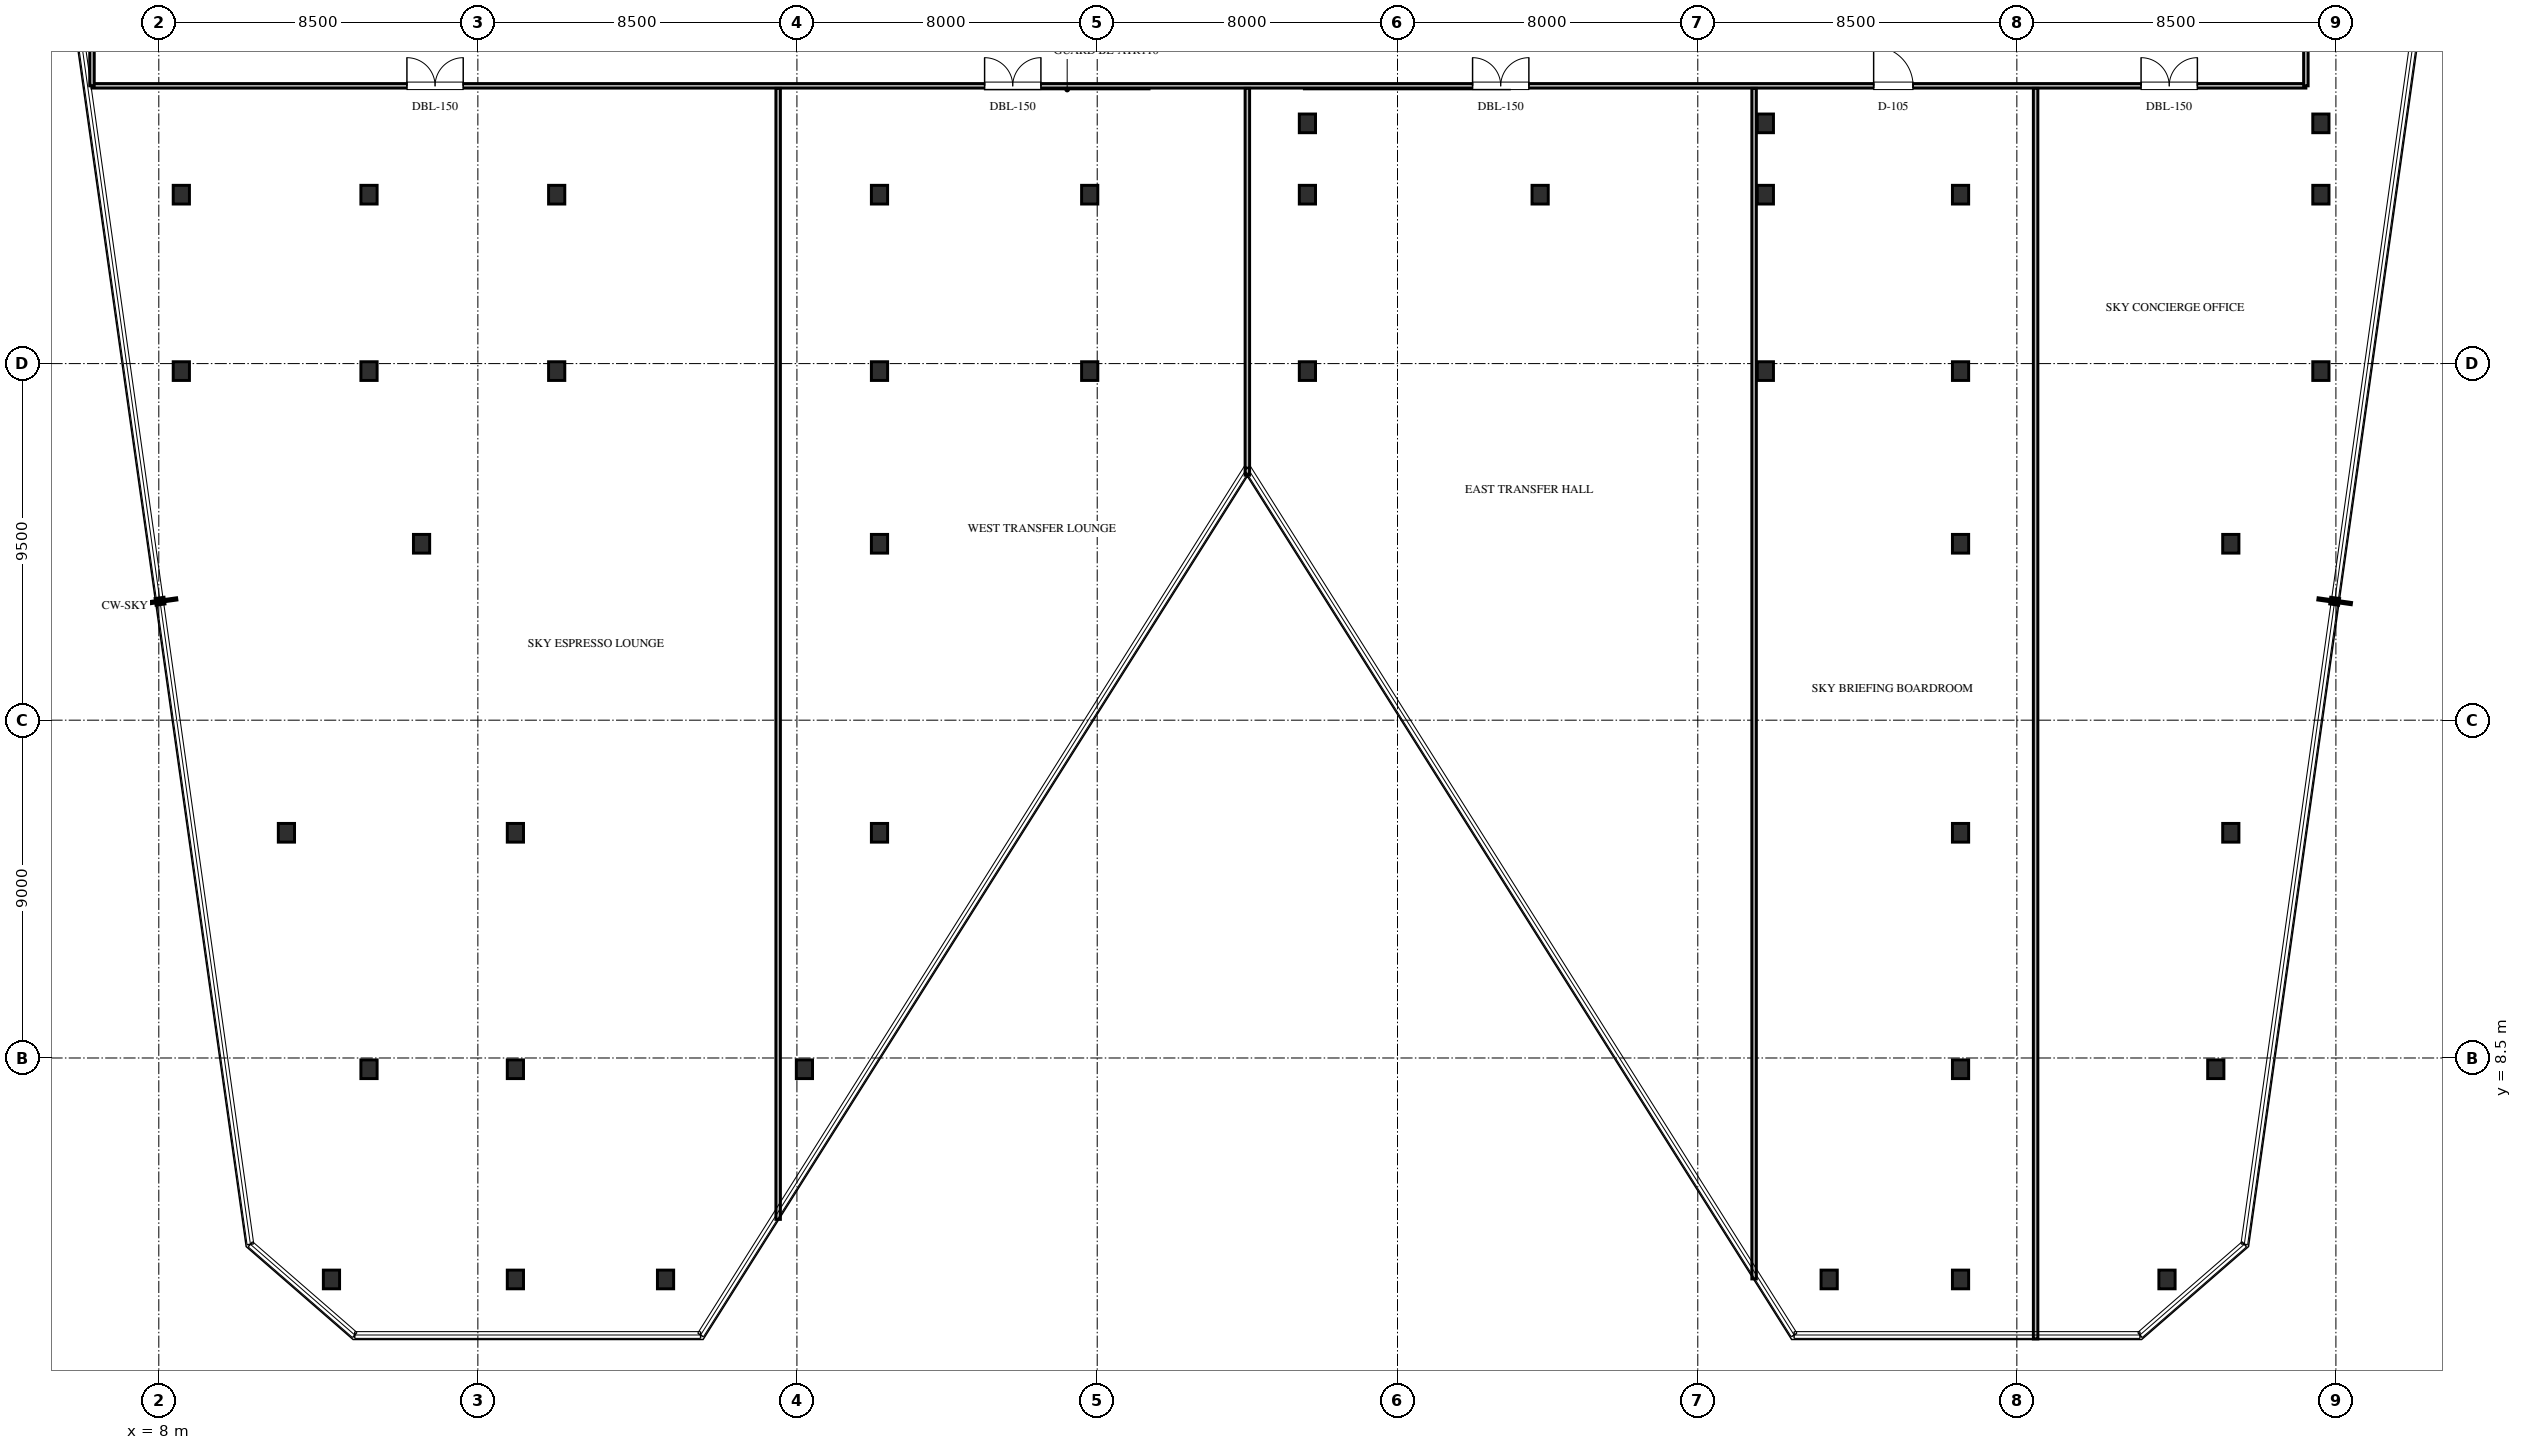
"""IFC4 building model, lengths in metres.
Left out: names, types, materials, properties, quantities, classifications, styles, units other than length and angle.
Written with IfcOpenShell. Run it as: python <this file> out.ifc"""

import sys

from ifc_helpers import new_model, si_unit, direction, frame, frame_2d, origin, origin_2d, place, context, subcontext, project, spatial, rectangle, i_section, extrude, element, fill, save


model = new_model("IFC4")
c1 = context("Model", 3, precision=1e-05, world=origin(), true_north=direction((0.0, 1.0)))
c2 = subcontext(c1, "Body", "Model", "MODEL_VIEW")
j1 = project(units=[si_unit("LENGTHUNIT", "METRE"), si_unit("PLANEANGLEUNIT", "RADIAN")], contexts=[c1])
p1 = place(None, origin())
s1 = spatial("IfcSite", under=j1, at=p1, CompositionType="ELEMENT")
p2 = place(p1, origin())
s2 = spatial("IfcBuilding", under=s1, at=p2, CompositionType="ELEMENT")
p3 = place(p2, frame((0.0, 0.0, 91.5)))
s3 = spatial("IfcBuildingStorey", under=s2, at=p3, CompositionType="ELEMENT", Elevation=91.5)
for number, where, z_axis, x_axis in (
    (1, (12.6, 2.6, 0.0), (0.0, 0.0, 1.0), (1.0, 0.0, 0.0)),
    (2, (56.0, 14.5, 0.0), (0.0, 0.0, 1.0), (1.0, 0.0, 0.0)),
    (3, (63.2, 14.5, 0.0), (0.0, 0.0, 1.0), (1.0, 0.0, 0.0)),
    (4, (15.0, 22.2, 0.0), (0.0, 0.0, 1.0), (1.0, 0.0, 0.0)),
    (5, (27.2, 22.2, 0.0), (0.0, 0.0, 1.0), (1.0, 0.0, 0.0)),
    (6, (56.0, 22.2, 0.0), (0.0, 0.0, 1.0), (1.0, 0.0, 0.0)),
    (7, (63.2, 22.2, 0.0), (0.0, 0.0, 1.0), (1.0, 0.0, 0.0)),
    (8, (8.6, 26.8, 0.0), (0.0, 0.0, 1.0), (1.0, 0.0, 0.0)),
    (9, (13.6, 26.8, 0.0), (0.0, 0.0, 1.0), (1.0, 0.0, 0.0)),
    (10, (18.6, 26.8, 0.0), (0.0, 0.0, 1.0), (1.0, 0.0, 0.0)),
    (11, (27.2, 26.8, 0.0), (0.0, 0.0, 1.0), (1.0, 0.0, 0.0)),
    (12, (32.8, 26.8, 0.0), (0.0, 0.0, 1.0), (1.0, 0.0, 0.0)),
    (13, (38.6, 26.8, 0.0), (0.0, 0.0, 1.0), (1.0, 0.0, 0.0)),
    (14, (50.8, 26.8, 0.0), (0.0, 0.0, 1.0), (1.0, 0.0, 0.0)),
    (15, (56.0, 26.8, 0.0), (0.0, 0.0, 1.0), (1.0, 0.0, 0.0)),
    (16, (65.6, 26.8, 0.0), (0.0, 0.0, 1.0), (1.0, 0.0, 0.0)),
    (17, (8.6, 31.5, 0.0), (0.0, 0.0, 1.0), (1.0, 0.0, 0.0)),
    (18, (13.6, 31.5, 0.0), (0.0, 0.0, 1.0), (1.0, 0.0, 0.0)),
    (19, (17.5, 2.6, 0.0), (0.0, 0.0, 1.0), (1.0, 0.0, 0.0)),
    (20, (18.6, 31.5, 0.0), (0.0, 0.0, 1.0), (1.0, 0.0, 0.0)),
    (21, (27.2, 31.5, 0.0), (0.0, 0.0, 1.0), (1.0, 0.0, 0.0)),
    (22, (32.8, 31.5, 0.0), (0.0, 0.0, 1.0), (1.0, 0.0, 0.0)),
    (23, (38.6, 31.5, 0.0), (0.0, 0.0, 1.0), (1.0, 0.0, 0.0)),
    (24, (44.8, 31.5, 0.0), (0.0, 0.0, 1.0), (1.0, 0.0, 0.0)),
    (25, (50.8, 31.5, 0.0), (0.0, 0.0, 1.0), (1.0, 0.0, 0.0)),
    (26, (56.0, 31.5, 0.0), (0.0, 0.0, 1.0), (1.0, 0.0, 0.0)),
    (27, (65.6, 31.5, 0.0), (0.0, 0.0, 1.0), (1.0, 0.0, 0.0)),
    (28, (21.5, 2.6, 0.0), (0.0, 0.0, 1.0), (1.0, 0.0, 0.0)),
    (29, (52.5, 2.6, 0.0), (0.0, 0.0, 1.0), (1.0, 0.0, 0.0)),
    (30, (56.0, 2.6, 0.0), (0.0, 0.0, 1.0), (1.0, 0.0, 0.0)),
    (31, (61.5, 2.6, 0.0), (0.0, 0.0, 1.0), (1.0, 0.0, 0.0)),
    (32, (13.6, 8.2, 0.0), (0.0, 0.0, 1.0), (1.0, 0.0, 0.0)),
    (33, (17.5, 8.2, 0.0), (0.0, 0.0, 1.0), (1.0, 0.0, 0.0)),
    (34, (25.2, 8.2, 0.0), (0.0, 0.0, 1.0), (1.0, 0.0, 0.0)),
    (35, (56.0, 8.2, 0.0), (0.0, 0.0, 1.0), (1.0, 0.0, 0.0)),
    (36, (62.8, 8.2, 0.0), (0.0, 0.0, 1.0), (1.0, 0.0, 0.0)),
    (37, (11.4, 14.5, 0.0), (0.0, 0.0, 1.0), (1.0, 0.0, 0.0)),
    (38, (17.5, 14.5, 0.0), (0.0, 0.0, 1.0), (1.0, 0.0, 0.0)),
    (39, (27.2, 14.5, 0.0), (0.0, 0.0, 1.0), (1.0, 0.0, 0.0)),
    (40, (38.6, 33.4, 0.0), (0.0, 0.0, 1.0), (1.0, 0.0, 0.0)),
    (41, (50.8, 33.4, 0.0), (0.0, 0.0, 1.0), (1.0, 0.0, 0.0)),
    (42, (65.6, 33.4, 0.0), (0.0, 0.0, 1.0), (1.0, 0.0, 0.0)),
):
    element("IfcColumn", number, at=place(p3, frame(where, z_axis=z_axis, x_axis=x_axis)), inside=s3, PredefinedType="COLUMN", context=c2, shape_type="SweptSolid", body=[
        extrude(i_section(OverallWidth=0.432, OverallDepth=0.498, WebThickness=0.056, FlangeThickness=0.089, FilletRadius=0.03, at=origin_2d()), origin(), (0.0, 0.0, 1.0), 4.5),
    ])
p4 = place(p3, frame((6.22, 34.4, 0.0), z_axis=(0.0, 0.0, 1.0), x_axis=(1.0, 0.0, 0.0)))
e43 = element("IfcWall", 43, at=p4, inside=s3, PredefinedType="PARTITIONING", context=c2, shape_type="SweptSolid", body=[
    extrude(rectangle(XDim=58.98, YDim=0.12, at=frame_2d((29.49, 0.0))), origin(), (0.0, 0.0, 1.0), 3.323),
])
p5 = place(p4, frame((8.39, 0.0, 0.0)))
e44 = element("IfcOpeningElement", 44, at=p5, cuts=e43, PredefinedType="OPENING", context=c2, shape_type="SweptSolid", body=[
    extrude(rectangle(XDim=1.5, YDim=2.2, at=frame_2d((0.75, 1.1))), frame((0.0, 0.07, 0.0), z_axis=(0.0, -1.0, 0.0), x_axis=(1.0, 0.0, 0.0)), (0.0, 0.0, 1.0), 0.14),
])
p6 = place(p4, frame((23.78, 0.0, 0.0)))
e45 = element("IfcOpeningElement", 45, at=p6, cuts=e43, PredefinedType="OPENING", context=c2, shape_type="SweptSolid", body=[
    extrude(rectangle(XDim=1.5, YDim=2.2, at=frame_2d((0.75, 1.1))), frame((0.0, 0.07, 0.0), z_axis=(0.0, -1.0, 0.0), x_axis=(1.0, 0.0, 0.0)), (0.0, 0.0, 1.0), 0.14),
])
p7 = place(p4, frame((36.78, 0.0, 0.0)))
e46 = element("IfcOpeningElement", 46, at=p7, cuts=e43, PredefinedType="OPENING", context=c2, shape_type="SweptSolid", body=[
    extrude(rectangle(XDim=1.5, YDim=2.2, at=frame_2d((0.75, 1.1))), frame((0.0, 0.07, 0.0), z_axis=(0.0, -1.0, 0.0), x_axis=(1.0, 0.0, 0.0)), (0.0, 0.0, 1.0), 0.14),
])
p8 = place(p4, frame((47.465, 0.0, 0.0)))
e47 = element("IfcOpeningElement", 47, at=p8, cuts=e43, PredefinedType="OPENING", context=c2, shape_type="SweptSolid", body=[
    extrude(rectangle(XDim=1.05, YDim=2.2, at=frame_2d((0.525, 1.1))), frame((0.0, 0.07, 0.0), z_axis=(0.0, -1.0, 0.0), x_axis=(1.0, 0.0, 0.0)), (0.0, 0.0, 1.0), 0.14),
])
p9 = place(p4, frame((54.59, 0.0, 0.0)))
e48 = element("IfcOpeningElement", 48, at=p9, cuts=e43, PredefinedType="OPENING", context=c2, shape_type="SweptSolid", body=[
    extrude(rectangle(XDim=1.5, YDim=2.2, at=frame_2d((0.75, 1.1))), frame((0.0, 0.07, 0.0), z_axis=(0.0, -1.0, 0.0), x_axis=(1.0, 0.0, 0.0)), (0.0, 0.0, 1.0), 0.14),
])
p10 = place(p3, frame((6.22, 34.4, 0.0), z_axis=(0.0, 0.0, 1.0), x_axis=(0.0, 1.0, 0.0)))
e49 = element("IfcWall", 49, at=p10, inside=s3, PredefinedType="PARTITIONING", context=c2, shape_type="SweptSolid", body=[
    extrude(rectangle(XDim=3.65, YDim=0.12, at=frame_2d((1.825, 0.0))), origin(), (0.0, 0.0, 1.0), 4.25),
])
p11 = place(p3, frame((65.2, 34.4, 0.0), z_axis=(0.0, 0.0, 1.0), x_axis=(0.0, 1.0, 0.0)))
e50 = element("IfcWall", 50, at=p11, inside=s3, PredefinedType="PARTITIONING", context=c2, shape_type="SweptSolid", body=[
    extrude(rectangle(XDim=3.217, YDim=0.12, at=frame_2d((1.608, 0.0))), origin(), (0.0, 0.0, 1.0), 3.323),
])
p12 = place(p3, frame((24.5, 4.2, 0.0), z_axis=(0.0, 0.0, 1.0), x_axis=(0.0, 1.0, 0.0)))
e51 = element("IfcWall", 51, at=p12, inside=s3, PredefinedType="PARTITIONING", context=c2, shape_type="SweptSolid", body=[
    extrude(rectangle(XDim=30.132, YDim=0.12, at=frame_2d((15.066, 0.0))), origin(), (0.0, 0.0, 1.0), 3.323),
])
p13 = place(p3, frame((37.0, 24.028, 0.0), z_axis=(0.0, 0.0, 1.0), x_axis=(0.0, 1.0, 0.0)))
e52 = element("IfcWall", 52, at=p13, inside=s3, PredefinedType="PARTITIONING", context=c2, shape_type="SweptSolid", body=[
    extrude(rectangle(XDim=10.304, YDim=0.12, at=frame_2d((5.152, 0.0))), origin(), (0.0, 0.0, 1.0), 3.209),
])
p14 = place(p3, frame((50.5, 2.614, 0.0), z_axis=(0.0, 0.0, 1.0), x_axis=(0.0, 1.0, 0.0)))
e53 = element("IfcWall", 53, at=p14, inside=s3, PredefinedType="PARTITIONING", context=c2, shape_type="SweptSolid", body=[
    extrude(rectangle(XDim=31.718, YDim=0.12, at=frame_2d((15.859, 0.0))), origin(), (0.0, 0.0, 1.0), 3.239),
])
p15 = place(p3, frame((58.0, 1.015, 0.0), z_axis=(0.0, 0.0, 1.0), x_axis=(0.0, 1.0, 0.0)))
e54 = element("IfcWall", 54, at=p15, inside=s3, PredefinedType="PARTITIONING", context=c2, shape_type="SweptSolid", body=[
    extrude(rectangle(XDim=33.317, YDim=0.12, at=frame_2d((16.659, 0.0))), origin(), (0.0, 0.0, 1.0), 3.323),
])
p16 = place(p5, origin())
e55 = element("IfcDoor", 55, at=p16, inside=s3, OperationType="DOUBLE_DOOR_SINGLE_SWING", PredefinedType="DOOR", context=c2, shape_type="SweptSolid", body=[
    extrude(rectangle(XDim=1.5, YDim=2.2, at=frame_2d((0.75, 1.1))), frame((0.0, 0.025, 0.0), z_axis=(0.0, -1.0, 0.0), x_axis=(1.0, 0.0, 0.0)), (0.0, 0.0, 1.0), 0.05),
])
fill(e44, e55)
p17 = place(p6, origin())
e56 = element("IfcDoor", 56, at=p17, inside=s3, OperationType="DOUBLE_DOOR_SINGLE_SWING", PredefinedType="DOOR", context=c2, shape_type="SweptSolid", body=[
    extrude(rectangle(XDim=1.5, YDim=2.2, at=frame_2d((0.75, 1.1))), frame((0.0, 0.025, 0.0), z_axis=(0.0, -1.0, 0.0), x_axis=(1.0, 0.0, 0.0)), (0.0, 0.0, 1.0), 0.05),
])
fill(e45, e56)
p18 = place(p7, origin())
e57 = element("IfcDoor", 57, at=p18, inside=s3, OperationType="DOUBLE_DOOR_SINGLE_SWING", PredefinedType="DOOR", context=c2, shape_type="SweptSolid", body=[
    extrude(rectangle(XDim=1.5, YDim=2.2, at=frame_2d((0.75, 1.1))), frame((0.0, 0.025, 0.0), z_axis=(0.0, -1.0, 0.0), x_axis=(1.0, 0.0, 0.0)), (0.0, 0.0, 1.0), 0.05),
])
fill(e46, e57)
p19 = place(p8, origin())
e58 = element("IfcDoor", 58, at=p19, inside=s3, OperationType="SINGLE_SWING_LEFT", PredefinedType="DOOR", context=c2, shape_type="SweptSolid", body=[
    extrude(rectangle(XDim=1.05, YDim=2.2, at=frame_2d((0.525, 1.1))), frame((0.0, 0.025, 0.0), z_axis=(0.0, -1.0, 0.0), x_axis=(1.0, 0.0, 0.0)), (0.0, 0.0, 1.0), 0.05),
])
fill(e47, e58)
p20 = place(p9, origin())
e59 = element("IfcDoor", 59, at=p20, inside=s3, OperationType="DOUBLE_DOOR_SINGLE_SWING", PredefinedType="DOOR", context=c2, shape_type="SweptSolid", body=[
    extrude(rectangle(XDim=1.5, YDim=2.2, at=frame_2d((0.75, 1.1))), frame((0.0, 0.025, 0.0), z_axis=(0.0, -1.0, 0.0), x_axis=(1.0, 0.0, 0.0)), (0.0, 0.0, 1.0), 0.05),
])
fill(e48, e59)
save(model, sys.argv[1])
